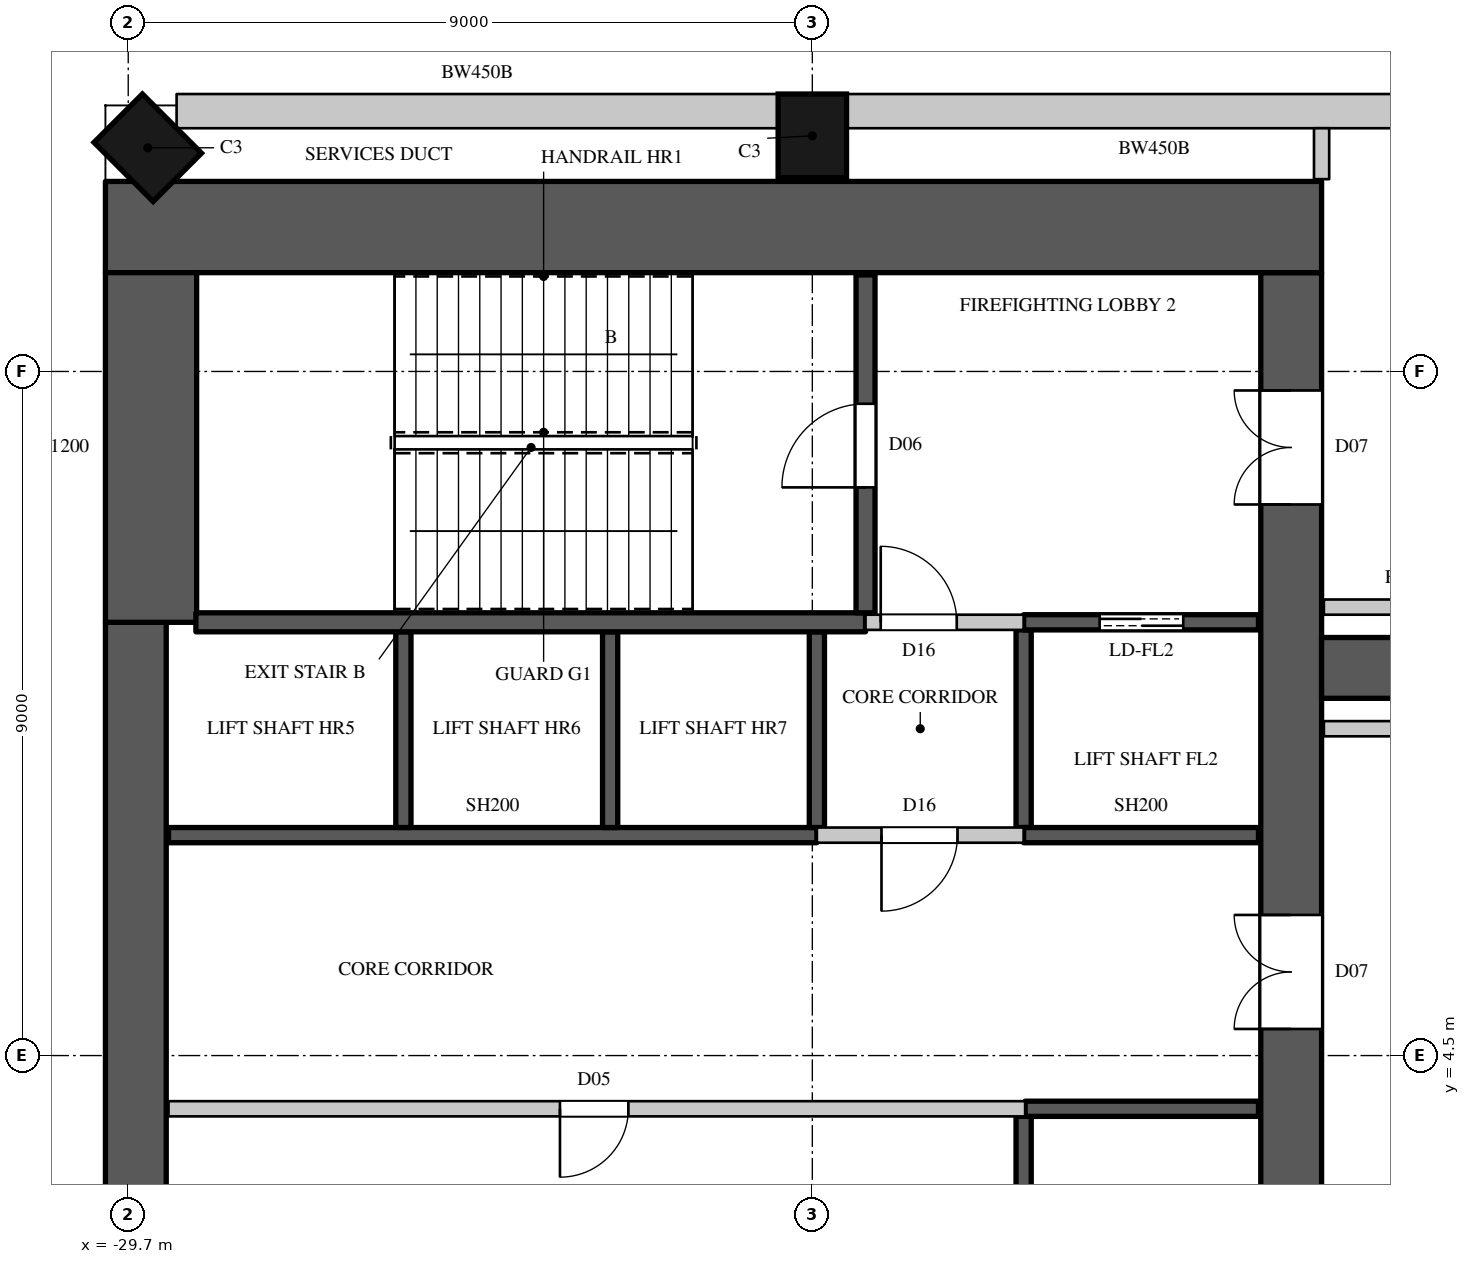
"""IFC4 building model, lengths in metres.
Left out: names, types, materials, properties, quantities, classifications, styles, units other than length and angle.
Written with IfcOpenShell. Run it as: python <this file> out.ifc"""

import sys

from ifc_helpers import new_model, si_unit, direction, frame, frame_2d, origin, origin_2d, place, context, subcontext, project, spatial, rectangle, extrude, element, fill, save


model = new_model("IFC4")
c1 = context("Model", 3, precision=1e-05, world=origin(), true_north=direction((0.0, 1.0)))
c2 = subcontext(c1, "Body", "Model", "MODEL_VIEW")
j1 = project(units=[si_unit("LENGTHUNIT", "METRE"), si_unit("PLANEANGLEUNIT", "RADIAN")], contexts=[c1])
p1 = place(None, origin())
s1 = spatial("IfcSite", under=j1, at=p1, CompositionType="ELEMENT")
p2 = place(p1, origin())
s2 = spatial("IfcBuilding", under=s1, at=p2, CompositionType="ELEMENT")
p3 = place(p2, frame((0.0, 0.0, 238.4)))
s3 = spatial("IfcBuildingStorey", under=s2, at=p3, CompositionType="ELEMENT", Elevation=238.4)
for number, where, z_axis, x_axis in (
    (1, (-29.443, 16.443, 0.0), (0.0, 0.0, 1.0), (-0.707, -0.707, 0.0)),
    (2, (-20.7, 16.6, 0.0), (0.0, 0.0, 1.0), (-1.0, 0.0, 0.0)),
):
    element("IfcColumn", number, at=place(p3, frame(where, z_axis=z_axis, x_axis=x_axis)), inside=s3, PredefinedType="COLUMN", context=c2, shape_type="SweptSolid", body=[
        extrude(rectangle(XDim=0.9, YDim=1.1, at=origin_2d()), origin(), (0.0, 0.0, 1.0), 5.0),
    ])
p4 = place(p3, frame((-14.0, 9.6, 0.0), z_axis=(0.0, 0.0, 1.0), x_axis=(1.0, 0.0, 0.0)))
e3 = element("IfcWall", 3, at=p4, inside=s3, PredefinedType="SOLIDWALL", context=c2, shape_type="SweptSolid", body=[
    extrude(rectangle(XDim=12.0, YDim=0.8, at=frame_2d((6.0, 0.0))), origin(), (0.0, 0.0, 1.0), 4.7),
])
p5 = place(p3, frame((-12.15, 16.925, 0.0), z_axis=(0.0, 0.0, 1.0), x_axis=(-1.0, 0.0, 0.0)))
e4 = element("IfcWall", 4, at=p5, inside=s3, PredefinedType="SOLIDWALL", context=c2, shape_type="SweptSolid", body=[
    extrude(rectangle(XDim=8.1, YDim=0.45, at=frame_2d((4.05, 0.0))), origin(), (0.0, 0.0, 1.0), 4.7),
])
p6 = place(p3, frame((-21.15, 16.925, 0.0), z_axis=(0.0, 0.0, 1.0), x_axis=(-1.0, 0.0, 0.0)))
e5 = element("IfcWall", 5, at=p6, inside=s3, PredefinedType="SOLIDWALL", context=c2, shape_type="SweptSolid", body=[
    extrude(rectangle(XDim=7.914, YDim=0.45, at=frame_2d((3.957, 0.0))), origin(), (0.0, 0.0, 1.0), 2.85),
])
p7 = place(p3, frame((-30.0, 15.4, 0.0), z_axis=(0.0, 0.0, 1.0), x_axis=(1.0, 0.0, 0.0)))
e6 = element("IfcWall", 6, at=p7, inside=s3, PredefinedType="SHEAR", context=c2, shape_type="SweptSolid", body=[
    extrude(rectangle(XDim=16.0, YDim=1.2, at=frame_2d((8.0, 0.0))), origin(), (0.0, 0.0, 1.0), 5.0),
])
p8 = place(p3, frame((-14.4, -14.8, 0.0), z_axis=(0.0, 0.0, 1.0), x_axis=(0.0, 1.0, 0.0)))
e7 = element("IfcWall", 7, at=p8, inside=s3, PredefinedType="SHEAR", context=c2, shape_type="SweptSolid", body=[
    extrude(rectangle(XDim=29.6, YDim=0.8, at=frame_2d((14.8, 0.0))), origin(), (0.0, 0.0, 1.0), 5.0),
])
p9 = place(p8, frame((1.55, 0.0, 0.0)))
e8 = element("IfcOpeningElement", 8, at=p9, cuts=e7, PredefinedType="OPENING", context=c2, shape_type="SweptSolid", body=[
    extrude(rectangle(XDim=1.5, YDim=2.4, at=frame_2d((0.75, 1.2))), frame((0.0, 0.41, 0.0), z_axis=(0.0, -1.0, 0.0), x_axis=(1.0, 0.0, 0.0)), (0.0, 0.0, 1.0), 0.82),
])
p10 = place(p8, frame((26.55, 0.0, 0.0)))
e9 = element("IfcOpeningElement", 9, at=p10, cuts=e7, PredefinedType="OPENING", context=c2, shape_type="SweptSolid", body=[
    extrude(rectangle(XDim=1.5, YDim=2.4, at=frame_2d((0.75, 1.2))), frame((0.0, 0.41, 0.0), z_axis=(0.0, -1.0, 0.0), x_axis=(1.0, 0.0, 0.0)), (0.0, 0.0, 1.0), 0.82),
])
p11 = place(p8, frame((8.45, 0.0, 0.0)))
e10 = element("IfcOpeningElement", 10, at=p11, cuts=e7, PredefinedType="OPENING", context=c2, shape_type="SweptSolid", body=[
    extrude(rectangle(XDim=1.5, YDim=2.4, at=frame_2d((0.75, 1.2))), frame((0.0, 0.41, 0.0), z_axis=(0.0, -1.0, 0.0), x_axis=(1.0, 0.0, 0.0)), (0.0, 0.0, 1.0), 0.82),
])
p12 = place(p8, frame((19.65, 0.0, 0.0)))
e11 = element("IfcOpeningElement", 11, at=p12, cuts=e7, PredefinedType="OPENING", context=c2, shape_type="SweptSolid", body=[
    extrude(rectangle(XDim=1.5, YDim=2.4, at=frame_2d((0.75, 1.2))), frame((0.0, 0.41, 0.0), z_axis=(0.0, -1.0, 0.0), x_axis=(1.0, 0.0, 0.0)), (0.0, 0.0, 1.0), 0.82),
])
p13 = place(p8, frame((14.5, 0.0, 0.0)))
e12 = element("IfcOpeningElement", 12, at=p13, cuts=e7, PredefinedType="OPENING", context=c2, shape_type="SweptSolid", body=[
    extrude(rectangle(XDim=0.6, YDim=2.0, at=frame_2d((0.3, 1.0))), frame((0.0, 0.41, 0.0), z_axis=(0.0, -1.0, 0.0), x_axis=(1.0, 0.0, 0.0)), (0.0, 0.0, 1.0), 0.82),
])
p14 = place(p3, frame((-29.6, -10.2, 0.0), z_axis=(0.0, 0.0, 1.0), x_axis=(0.0, 1.0, 0.0)))
e13 = element("IfcWall", 13, at=p14, inside=s3, PredefinedType="SHEAR", context=c2, shape_type="SweptSolid", body=[
    extrude(rectangle(XDim=20.4, YDim=0.8, at=frame_2d((10.2, 0.0))), origin(), (0.0, 0.0, 1.0), 5.0),
])
p15 = place(p3, frame((-29.4, 10.2, 0.0), z_axis=(0.0, 0.0, 1.0), x_axis=(0.0, 1.0, 0.0)))
e14 = element("IfcWall", 14, at=p15, inside=s3, PredefinedType="SHEAR", context=c2, shape_type="SweptSolid", body=[
    extrude(rectangle(XDim=4.6, YDim=1.2, at=frame_2d((2.3, 0.0))), origin(), (0.0, 0.0, 1.0), 5.0),
])
p16 = place(p3, frame((-20.64, 7.4, 0.0), z_axis=(0.0, 0.0, 1.0), x_axis=(1.0, 0.0, 0.0)))
e15 = element("IfcWall", 15, at=p16, inside=s3, PredefinedType="PARTITIONING", context=c2, shape_type="SweptSolid", body=[
    extrude(rectangle(XDim=2.72, YDim=0.2, at=frame_2d((1.36, 0.0))), origin(), (0.0, 0.0, 1.0), 4.7),
])
p17 = place(p16, frame((0.85, 0.0, 0.0)))
e16 = element("IfcOpeningElement", 16, at=p17, cuts=e15, PredefinedType="OPENING", context=c2, shape_type="SweptSolid", body=[
    extrude(rectangle(XDim=1.0, YDim=2.2, at=frame_2d((0.5, 1.1))), frame((0.0, 0.11, 0.0), z_axis=(0.0, -1.0, 0.0), x_axis=(1.0, 0.0, 0.0)), (0.0, 0.0, 1.0), 0.22),
])
p18 = place(p3, frame((-20.0, 10.2, 0.0), z_axis=(0.0, 0.0, 1.0), x_axis=(1.0, 0.0, 0.0)))
e17 = element("IfcWall", 17, at=p18, inside=s3, PredefinedType="PARTITIONING", context=c2, shape_type="SweptSolid", body=[
    extrude(rectangle(XDim=2.08, YDim=0.2, at=frame_2d((1.04, 0.0))), origin(), (0.0, 0.0, 1.0), 4.7),
])
p19 = place(p18, frame((0.2, 0.0, 0.0)))
e18 = element("IfcOpeningElement", 18, at=p19, cuts=e17, PredefinedType="OPENING", context=c2, shape_type="SweptSolid", body=[
    extrude(rectangle(XDim=1.0, YDim=2.2, at=frame_2d((0.5, 1.1))), frame((0.0, 0.11, 0.0), z_axis=(0.0, -1.0, 0.0), x_axis=(1.0, 0.0, 0.0)), (0.0, 0.0, 1.0), 0.22),
])
p20 = place(p3, frame((-13.97, 8.8, 0.0), z_axis=(0.0, 0.0, 1.0), x_axis=(1.0, 0.0, 0.0)))
e19 = element("IfcWall", 19, at=p20, inside=s3, PredefinedType="PARTITIONING", context=c2, shape_type="SweptSolid", body=[
    extrude(rectangle(XDim=2.29, YDim=0.2, at=frame_2d((1.145, 0.0))), origin(), (0.0, 0.0, 1.0), 4.7),
])
p21 = place(p3, frame((-13.97, 10.4, 0.0), z_axis=(0.0, 0.0, 1.0), x_axis=(1.0, 0.0, 0.0)))
e20 = element("IfcWall", 20, at=p21, inside=s3, PredefinedType="PARTITIONING", context=c2, shape_type="SweptSolid", body=[
    extrude(rectangle(XDim=2.37, YDim=0.2, at=frame_2d((1.185, 0.0))), origin(), (0.0, 0.0, 1.0), 4.7),
])
p22 = place(p3, frame((-29.17, 3.8, 0.0), z_axis=(0.0, 0.0, 1.0), x_axis=(1.0, 0.0, 0.0)))
e21 = element("IfcWall", 21, at=p22, inside=s3, PredefinedType="PARTITIONING", context=c2, shape_type="SweptSolid", body=[
    extrude(rectangle(XDim=11.27, YDim=0.2, at=frame_2d((5.635, 0.0))), origin(), (0.0, 0.0, 1.0), 4.7),
])
p23 = place(p22, frame((5.15, 0.0, 0.0)))
e22 = element("IfcOpeningElement", 22, at=p23, cuts=e21, PredefinedType="OPENING", context=c2, shape_type="SweptSolid", body=[
    extrude(rectangle(XDim=0.9, YDim=2.2, at=frame_2d((0.45, 1.1))), frame((0.0, 0.11, 0.0), z_axis=(0.0, -1.0, 0.0), x_axis=(1.0, 0.0, 0.0)), (0.0, 0.0, 1.0), 0.22),
])
p24 = place(p3, frame((-14.0, 16.03, 0.0), z_axis=(0.0, 0.0, 1.0), x_axis=(0.0, 1.0, 0.0)))
e23 = element("IfcWall", 23, at=p24, inside=s3, PredefinedType="PARTITIONING", context=c2, shape_type="SweptSolid", body=[
    extrude(rectangle(XDim=0.67, YDim=0.2, at=frame_2d((0.335, 0.0))), origin(), (0.0, 0.0, 1.0), 4.7),
])
p25 = place(p3, frame((-29.17, 7.4, 0.0), z_axis=(0.0, 0.0, 1.0), x_axis=(1.0, 0.0, 0.0)))
e24 = element("IfcWall", 24, at=p25, inside=s3, PredefinedType="SHEAR", context=c2, shape_type="SweptSolid", body=[
    extrude(rectangle(XDim=8.53, YDim=0.2, at=frame_2d((4.265, 0.0))), origin(), (0.0, 0.0, 1.0), 4.7),
])
for number, where, z_axis, x_axis in (
    (25, (-26.08, 7.5, 0.0), (0.0, 0.0, 1.0), (0.0, 1.0, 0.0)),
    (26, (-23.36, 7.5, 0.0), (0.0, 0.0, 1.0), (0.0, 1.0, 0.0)),
):
    element("IfcWall", number, at=place(p3, frame(where, z_axis=z_axis, x_axis=x_axis)), inside=s3, PredefinedType="SHEAR", context=c2, shape_type="SweptSolid", body=[
        extrude(rectangle(XDim=2.575, YDim=0.2, at=frame_2d((1.288, 0.0))), origin(), (0.0, 0.0, 1.0), 5.0),
    ])
p26 = place(p3, frame((-20.64, 7.5, 0.0), z_axis=(0.0, 0.0, 1.0), x_axis=(0.0, 1.0, 0.0)))
e27 = element("IfcWall", 27, at=p26, inside=s3, PredefinedType="SHEAR", context=c2, shape_type="SweptSolid", body=[
    extrude(rectangle(XDim=2.575, YDim=0.2, at=frame_2d((1.288, 0.0))), origin(), (0.0, 0.0, 1.0), 4.7),
])
p27 = place(p3, frame((-17.92, 1.1, 0.0), z_axis=(0.0, 0.0, 1.0), x_axis=(0.0, 1.0, 0.0)))
e28 = element("IfcWall", 28, at=p27, inside=s3, PredefinedType="SHEAR", context=c2, shape_type="SweptSolid", body=[
    extrude(rectangle(XDim=2.6, YDim=0.2, at=frame_2d((1.3, 0.0))), origin(), (0.0, 0.0, 1.0), 4.7),
])
p28 = place(p3, frame((-17.9, 3.8, 0.0), z_axis=(0.0, 0.0, 1.0), x_axis=(1.0, 0.0, 0.0)))
e29 = element("IfcWall", 29, at=p28, inside=s3, PredefinedType="SHEAR", context=c2, shape_type="SweptSolid", body=[
    extrude(rectangle(XDim=3.07, YDim=0.2, at=frame_2d((1.535, 0.0))), origin(), (0.0, 0.0, 1.0), 4.7),
])
p29 = place(p3, frame((-17.92, 7.5, 0.0), z_axis=(0.0, 0.0, 1.0), x_axis=(0.0, 1.0, 0.0)))
e30 = element("IfcWall", 30, at=p29, inside=s3, PredefinedType="SHEAR", context=c2, shape_type="SweptSolid", body=[
    extrude(rectangle(XDim=2.6, YDim=0.2, at=frame_2d((1.3, 0.0))), origin(), (0.0, 0.0, 1.0), 4.7),
])
p30 = place(p3, frame((-17.92, 7.4, 0.0), z_axis=(0.0, 0.0, 1.0), x_axis=(1.0, 0.0, 0.0)))
e31 = element("IfcWall", 31, at=p30, inside=s3, PredefinedType="SHEAR", context=c2, shape_type="SweptSolid", body=[
    extrude(rectangle(XDim=3.09, YDim=0.2, at=frame_2d((1.545, 0.0))), origin(), (0.0, 0.0, 1.0), 4.7),
])
p31 = place(p3, frame((-17.92, 10.2, 0.0), z_axis=(0.0, 0.0, 1.0), x_axis=(1.0, 0.0, 0.0)))
e32 = element("IfcWall", 32, at=p31, inside=s3, PredefinedType="SHEAR", context=c2, shape_type="SweptSolid", body=[
    extrude(rectangle(XDim=3.09, YDim=0.2, at=frame_2d((1.545, 0.0))), origin(), (0.0, 0.0, 1.0), 4.7),
])
p32 = place(p31, frame((1.0, 0.0, 0.0)))
e33 = element("IfcOpeningElement", 33, at=p32, cuts=e32, PredefinedType="OPENING", context=c2, shape_type="SweptSolid", body=[
    extrude(rectangle(XDim=1.1, YDim=2.2, at=frame_2d((0.55, 1.1))), frame((0.0, 0.11, 0.0), z_axis=(0.0, -1.0, 0.0), x_axis=(1.0, 0.0, 0.0)), (0.0, 0.0, 1.0), 0.22),
])
p33 = place(p3, frame((-28.81, 10.2, 0.0), z_axis=(0.0, 0.0, 1.0), x_axis=(1.0, 0.0, 0.0)))
e34 = element("IfcWall", 34, at=p33, inside=s3, PredefinedType="SHEAR", context=c2, shape_type="SweptSolid", body=[
    extrude(rectangle(XDim=8.81, YDim=0.25, at=frame_2d((4.405, 0.0))), origin(), (0.0, 0.0, 1.0), 4.7),
])
p34 = place(p3, frame((-20.0, 10.325, 0.0), z_axis=(0.0, 0.0, 1.0), x_axis=(0.0, 1.0, 0.0)))
e35 = element("IfcWall", 35, at=p34, inside=s3, PredefinedType="SHEAR", context=c2, shape_type="SweptSolid", body=[
    extrude(rectangle(XDim=4.445, YDim=0.25, at=frame_2d((2.223, 0.0))), origin(), (0.0, 0.0, 1.0), 4.7),
])
p35 = place(p34, frame((1.65, 0.0, 0.0)))
e36 = element("IfcOpeningElement", 36, at=p35, cuts=e35, PredefinedType="OPENING", context=c2, shape_type="SweptSolid", body=[
    extrude(rectangle(XDim=1.1, YDim=2.2, at=frame_2d((0.55, 1.1))), frame((0.0, 0.135, 0.0), z_axis=(0.0, -1.0, 0.0), x_axis=(1.0, 0.0, 0.0)), (0.0, 0.0, 1.0), 0.27),
])
p36 = place(p35, origin())
e37 = element("IfcDoor", 37, at=p36, inside=s3, OperationType="SINGLE_SWING_LEFT", PredefinedType="DOOR", context=c2, shape_type="SweptSolid", body=[
    extrude(rectangle(XDim=1.1, YDim=2.2, at=frame_2d((0.55, 1.1))), frame((0.0, 0.025, 0.0), z_axis=(0.0, -1.0, 0.0), x_axis=(1.0, 0.0, 0.0)), (0.0, 0.0, 1.0), 0.05),
])
fill(e36, e37)
p37 = place(p17, origin())
e38 = element("IfcDoor", 38, at=p37, inside=s3, OperationType="SINGLE_SWING_RIGHT", PredefinedType="DOOR", context=c2, shape_type="SweptSolid", body=[
    extrude(rectangle(XDim=1.0, YDim=2.2, at=frame_2d((0.5, 1.1))), frame((0.0, 0.025, 0.0), z_axis=(0.0, -1.0, 0.0), x_axis=(1.0, 0.0, 0.0)), (0.0, 0.0, 1.0), 0.05),
])
fill(e16, e38)
p38 = place(p19, origin())
e39 = element("IfcDoor", 39, at=p38, inside=s3, OperationType="SINGLE_SWING_LEFT", PredefinedType="DOOR", context=c2, shape_type="SweptSolid", body=[
    extrude(rectangle(XDim=1.0, YDim=2.2, at=frame_2d((0.5, 1.1))), frame((0.0, 0.025, 0.0), z_axis=(0.0, -1.0, 0.0), x_axis=(1.0, 0.0, 0.0)), (0.0, 0.0, 1.0), 0.05),
])
fill(e18, e39)
p39 = place(p23, origin())
e40 = element("IfcDoor", 40, at=p39, inside=s3, OperationType="SINGLE_SWING_RIGHT", PredefinedType="DOOR", context=c2, shape_type="SweptSolid", body=[
    extrude(rectangle(XDim=0.9, YDim=2.2, at=frame_2d((0.45, 1.1))), frame((0.0, 0.025, 0.0), z_axis=(0.0, -1.0, 0.0), x_axis=(1.0, 0.0, 0.0)), (0.0, 0.0, 1.0), 0.05),
])
fill(e22, e40)
p40 = place(p32, origin())
e41 = element("IfcDoor", 41, at=p40, inside=s3, OperationType="DOUBLE_DOOR_SLIDING", PredefinedType="DOOR", context=c2, shape_type="SweptSolid", body=[
    extrude(rectangle(XDim=1.1, YDim=2.2, at=frame_2d((0.55, 1.1))), frame((0.0, 0.025, 0.0), z_axis=(0.0, -1.0, 0.0), x_axis=(1.0, 0.0, 0.0)), (0.0, 0.0, 1.0), 0.05),
])
fill(e33, e41)
p41 = place(p10, origin())
e42 = element("IfcDoor", 42, at=p41, inside=s3, OperationType="DOUBLE_DOOR_SINGLE_SWING", PredefinedType="DOOR", context=c2, shape_type="SweptSolid", body=[
    extrude(rectangle(XDim=1.5, YDim=2.4, at=frame_2d((0.75, 1.2))), frame((0.0, 0.395, 0.0), z_axis=(0.0, -1.0, 0.0), x_axis=(1.0, 0.0, 0.0)), (0.0, 0.0, 1.0), 0.05),
])
fill(e9, e42)
p42 = place(p12, origin())
e43 = element("IfcDoor", 43, at=p42, inside=s3, OperationType="DOUBLE_DOOR_SINGLE_SWING", PredefinedType="DOOR", context=c2, shape_type="SweptSolid", body=[
    extrude(rectangle(XDim=1.5, YDim=2.4, at=frame_2d((0.75, 1.2))), frame((0.0, 0.395, 0.0), z_axis=(0.0, -1.0, 0.0), x_axis=(1.0, 0.0, 0.0)), (0.0, 0.0, 1.0), 0.05),
])
fill(e11, e43)
save(model, sys.argv[1])
